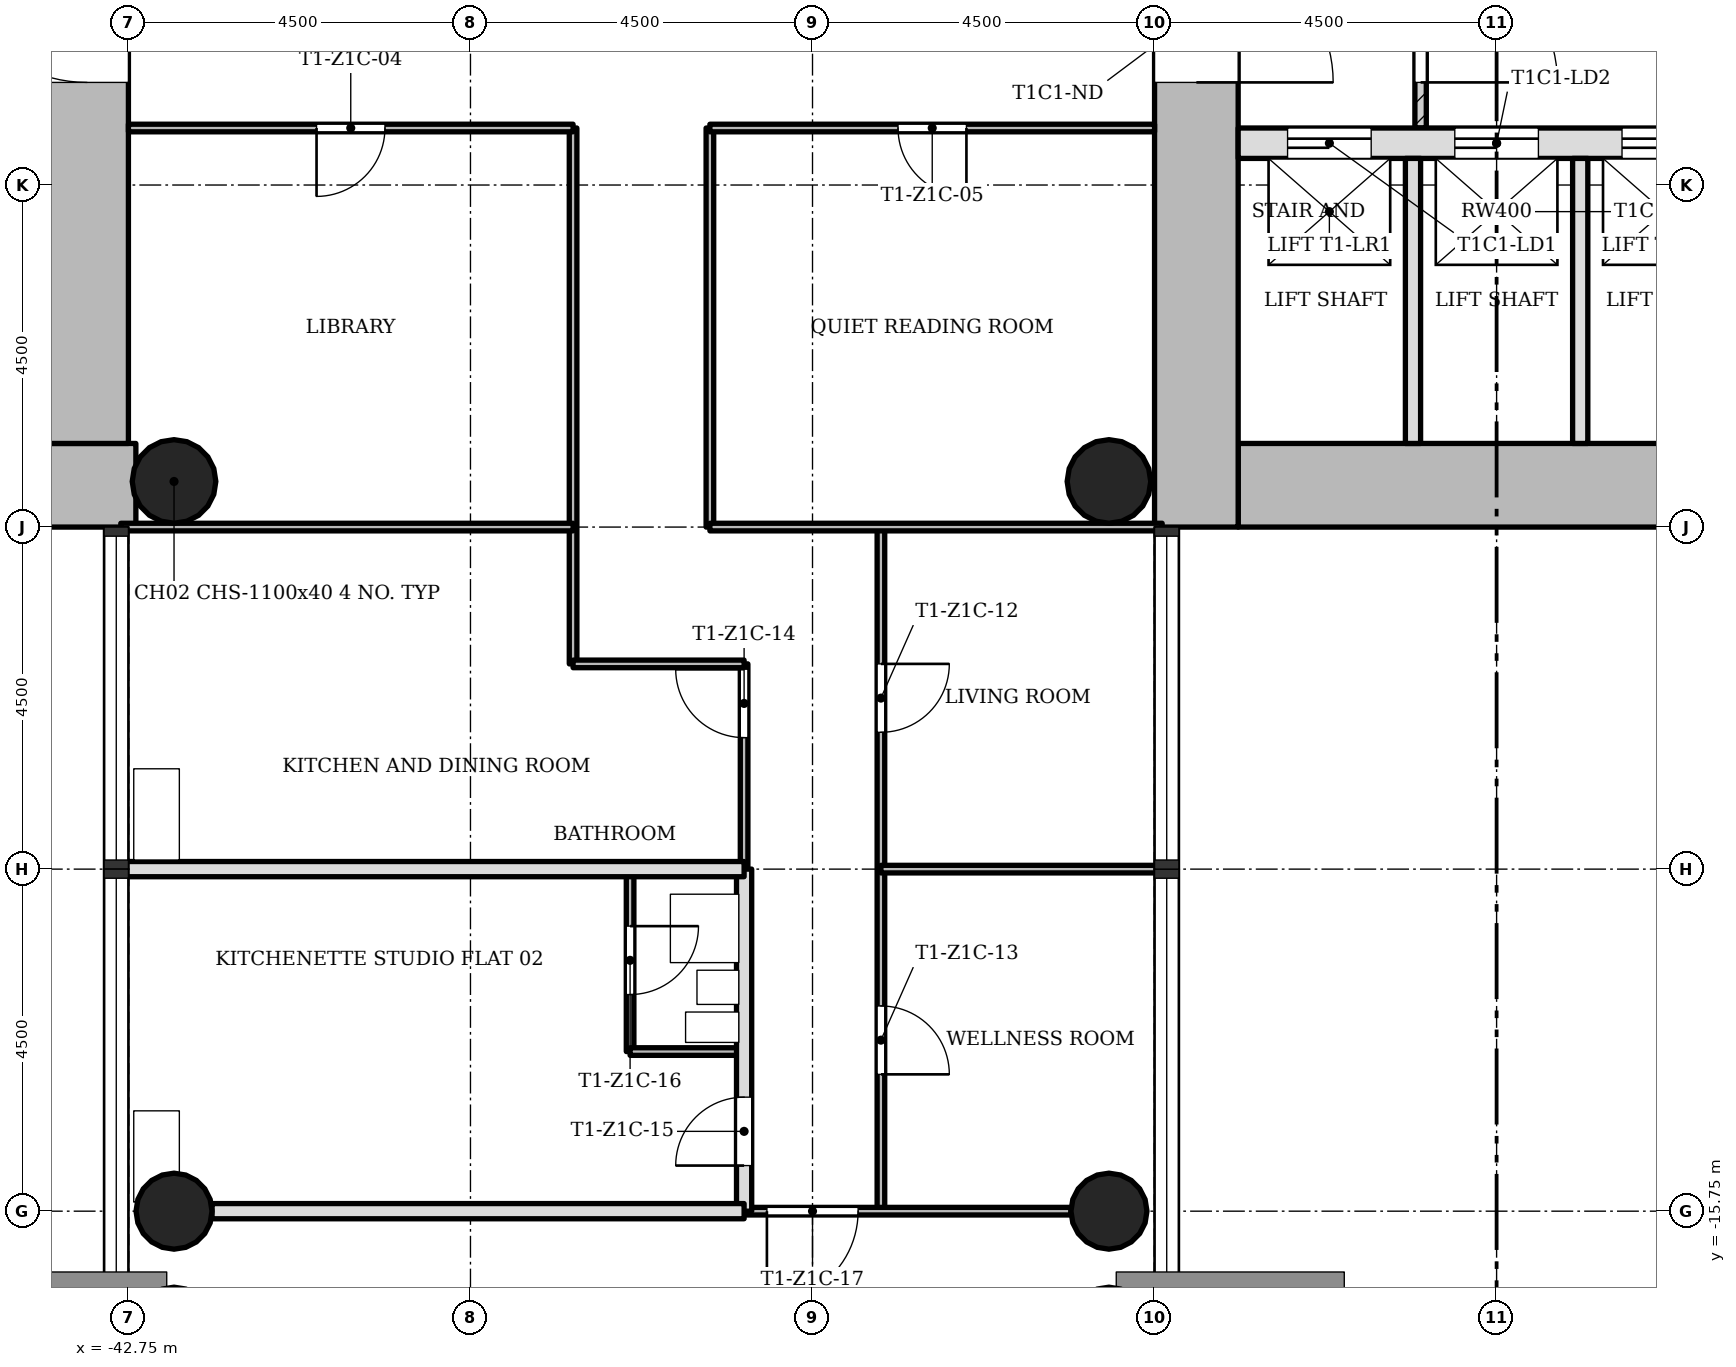
"""IFC4 building model, lengths in metres.
Left out: names, types, materials, properties, quantities, classifications, styles, units other than length and angle.
Written with IfcOpenShell. Run it as: python <this file> out.ifc"""

import sys

from ifc_helpers import new_model, si_unit, direction, frame, frame_2d, origin, origin_2d, place, context, subcontext, project, spatial, rectangle, hollow_circle, extrude, element, fill, save


model = new_model("IFC4")
c1 = context("Model", 3, precision=1e-05, world=origin(), true_north=direction((0.0, 1.0)))
c2 = subcontext(c1, "Body", "Model", "MODEL_VIEW")
j1 = project(units=[si_unit("LENGTHUNIT", "METRE"), si_unit("PLANEANGLEUNIT", "RADIAN")], contexts=[c1])
p1 = place(None, origin())
s1 = spatial("IfcSite", under=j1, at=p1, CompositionType="ELEMENT")
p2 = place(p1, origin())
s2 = spatial("IfcBuilding", under=s1, at=p2, CompositionType="ELEMENT")
p3 = place(p2, frame((0.0, 0.0, 51.7)))
s3 = spatial("IfcBuildingStorey", under=s2, at=p3, CompositionType="ELEMENT", Elevation=51.7)
p4 = place(p3, frame((-28.15, -6.2, 0.0), z_axis=(0.0, 0.0, 1.0), x_axis=(1.0, 0.0, 0.0)))
e1 = element("IfcWall", 1, at=p4, inside=s3, PredefinedType="SHEAR", context=c2, shape_type="SweptSolid", body=[
    extrude(rectangle(XDim=7.9, YDim=1.1, at=frame_2d((3.95, 0.0))), origin(), (0.0, 0.0, 1.0), 3.4),
])
p5 = place(p3, frame((-28.7, 5.65, 0.0), z_axis=(0.0, 0.0, 1.0), x_axis=(0.0, -1.0, 0.0)))
e2 = element("IfcWall", 2, at=p5, inside=s3, PredefinedType="SHEAR", context=c2, shape_type="SweptSolid", body=[
    extrude(rectangle(XDim=12.4, YDim=1.1, at=frame_2d((6.2, 0.0))), origin(), (0.0, 0.0, 1.0), 3.4),
])
p6 = place(p5, frame((4.75, 0.0, 0.0)))
e3 = element("IfcOpeningElement", 3, at=p6, cuts=e2, PredefinedType="OPENING", context=c2, shape_type="SweptSolid", body=[
    extrude(rectangle(XDim=1.8, YDim=2.1, at=frame_2d((0.9, 1.05))), frame((0.0, 0.56, 0.0), z_axis=(0.0, -1.0, 0.0), x_axis=(1.0, 0.0, 0.0)), (0.0, 0.0, 1.0), 1.12),
])
p7 = place(p3, frame((-28.15, -1.7, 0.0), z_axis=(0.0, 0.0, 1.0), x_axis=(1.0, 0.0, 0.0)))
e4 = element("IfcWall", 4, at=p7, inside=s3, PredefinedType="SHEAR", context=c2, shape_type="SweptSolid", body=[
    extrude(rectangle(XDim=6.8, YDim=0.4, at=frame_2d((3.4, 0.0))), origin(), (0.0, 0.0, 1.0), 3.4),
])
p8 = place(p7, frame((0.65, 0.0, 0.0)))
e5 = element("IfcOpeningElement", 5, at=p8, cuts=e4, PredefinedType="OPENING", context=c2, shape_type="SweptSolid", body=[
    extrude(rectangle(XDim=1.1, YDim=2.1, at=frame_2d((0.55, 1.05))), frame((0.0, 0.21, 0.0), z_axis=(0.0, -1.0, 0.0), x_axis=(1.0, 0.0, 0.0)), (0.0, 0.0, 1.0), 0.42),
])
p9 = place(p7, frame((2.85, 0.0, 0.0)))
e6 = element("IfcOpeningElement", 6, at=p9, cuts=e4, PredefinedType="OPENING", context=c2, shape_type="SweptSolid", body=[
    extrude(rectangle(XDim=1.1, YDim=2.1, at=frame_2d((0.55, 1.05))), frame((0.0, 0.21, 0.0), z_axis=(0.0, -1.0, 0.0), x_axis=(1.0, 0.0, 0.0)), (0.0, 0.0, 1.0), 0.42),
])
p10 = place(p7, frame((5.05, 0.0, 0.0)))
e7 = element("IfcOpeningElement", 7, at=p10, cuts=e4, PredefinedType="OPENING", context=c2, shape_type="SweptSolid", body=[
    extrude(rectangle(XDim=1.1, YDim=2.1, at=frame_2d((0.55, 1.05))), frame((0.0, 0.21, 0.0), z_axis=(0.0, -1.0, 0.0), x_axis=(1.0, 0.0, 0.0)), (0.0, 0.0, 1.0), 0.42),
])
p11 = place(p3, frame((-50.65, -6.2, 0.0), z_axis=(0.0, 0.0, 1.0), x_axis=(1.0, 0.0, 0.0)))
e8 = element("IfcWall", 8, at=p11, inside=s3, PredefinedType="SHEAR", context=c2, shape_type="SweptSolid", body=[
    extrude(rectangle(XDim=7.998, YDim=1.1, at=frame_2d((3.999, 0.0))), origin(), (0.0, 0.0, 1.0), 3.4),
])
p12 = place(p3, frame((-43.3, -5.65, 0.0), z_axis=(0.0, 0.0, 1.0), x_axis=(0.0, 1.0, 0.0)))
e9 = element("IfcWall", 9, at=p12, inside=s3, PredefinedType="SHEAR", context=c2, shape_type="SweptSolid", body=[
    extrude(rectangle(XDim=12.4, YDim=1.1, at=frame_2d((6.2, 0.0))), origin(), (0.0, 0.0, 1.0), 3.4),
])
p13 = place(p12, frame((4.75, 0.0, 0.0)))
e10 = element("IfcOpeningElement", 10, at=p13, cuts=e9, PredefinedType="OPENING", context=c2, shape_type="SweptSolid", body=[
    extrude(rectangle(XDim=1.8, YDim=2.1, at=frame_2d((0.9, 1.05))), frame((0.0, 0.56, 0.0), z_axis=(0.0, -1.0, 0.0), x_axis=(1.0, 0.0, 0.0)), (0.0, 0.0, 1.0), 1.12),
])
for number, where, z_axis, x_axis in (
    (11, (-42.15, -15.75, 0.0), (0.0, 0.0, 1.0), (1.0, 0.0, 0.0)),
    (12, (-29.85, -15.75, 0.0), (0.0, 0.0, 1.0), (1.0, 0.0, 0.0)),
):
    element("IfcColumn", number, at=place(p3, frame(where, z_axis=z_axis, x_axis=x_axis)), inside=s3, PredefinedType="COLUMN", context=c2, shape_type="SweptSolid", body=[
        extrude(hollow_circle(Radius=0.5, WallThickness=0.036, at=origin_2d()), origin(), (0.0, 0.0, 1.0), 3.4),
    ])
for number, where, z_axis, x_axis in (
    (13, (-42.15, -6.15, 0.0), (0.0, 0.0, 1.0), (1.0, 0.0, 0.0)),
    (14, (-29.85, -6.15, 0.0), (0.0, 0.0, 1.0), (1.0, 0.0, 0.0)),
):
    element("IfcColumn", number, at=place(p3, frame(where, z_axis=z_axis, x_axis=x_axis)), inside=s3, PredefinedType="COLUMN", context=c2, shape_type="SweptSolid", body=[
        extrude(hollow_circle(Radius=0.55, WallThickness=0.04, at=origin_2d()), origin(), (0.0, 0.0, 1.0), 3.4),
    ])
p14 = place(p3, frame((-25.75, -1.5, 0.0), z_axis=(0.0, 0.0, 1.0), x_axis=(0.0, 1.0, 0.0)))
e15 = element("IfcWall", 15, at=p14, inside=s3, PredefinedType="PARTITIONING", context=c2, shape_type="SweptSolid", body=[
    extrude(rectangle(XDim=3.0, YDim=0.15, at=frame_2d((1.5, 0.0))), origin(), (0.0, 0.0, 1.0), 3.0),
])
p15 = place(p14, frame((0.6, 0.0, 0.0)))
e16 = element("IfcOpeningElement", 16, at=p15, cuts=e15, PredefinedType="OPENING", context=c2, shape_type="SweptSolid", body=[
    extrude(rectangle(XDim=1.8, YDim=2.1, at=frame_2d((0.9, 1.05))), frame((0.0, 0.085, 0.0), z_axis=(0.0, -1.0, 0.0), x_axis=(1.0, 0.0, 0.0)), (0.0, 0.0, 1.0), 0.17),
])
for number, where, z_axis, x_axis in (
    (17, (-25.85, -5.65, 0.0), (0.0, 0.0, 1.0), (0.0, 1.0, 0.0)),
    (18, (-23.65, -5.65, 0.0), (0.0, 0.0, 1.0), (0.0, 1.0, 0.0)),
):
    element("IfcWall", number, at=place(p3, frame(where, z_axis=z_axis, x_axis=x_axis)), inside=s3, PredefinedType="SOLIDWALL", context=c2, shape_type="SweptSolid", body=[
        extrude(rectangle(XDim=3.75, YDim=0.2, at=frame_2d((1.875, 0.0))), origin(), (0.0, 0.0, 1.0), 3.0),
    ])
p16 = place(p3, frame((-36.9, -8.55, 0.0), z_axis=(0.0, 0.0, 1.0), x_axis=(0.0, 1.0, 0.0)))
e19 = element("IfcWall", 19, at=p16, inside=s3, PredefinedType="PARTITIONING", context=c2, shape_type="SweptSolid", body=[
    extrude(rectangle(XDim=7.05, YDim=0.1, at=frame_2d((3.525, 0.0))), origin(), (0.0, 0.0, 1.0), 3.0),
])
p17 = place(p3, frame((-36.15, -13.65, 0.0), z_axis=(0.0, 0.0, 1.0), x_axis=(0.0, 1.0, 0.0)))
e20 = element("IfcWall", 20, at=p17, inside=s3, PredefinedType="PARTITIONING", context=c2, shape_type="SweptSolid", body=[
    extrude(rectangle(XDim=2.4, YDim=0.1, at=frame_2d((1.2, 0.0))), origin(), (0.0, 0.0, 1.0), 3.0),
])
p18 = place(p17, frame((0.75, 0.0, 0.0)))
e21 = element("IfcOpeningElement", 21, at=p18, cuts=e20, PredefinedType="OPENING", context=c2, shape_type="SweptSolid", body=[
    extrude(rectangle(XDim=0.9, YDim=2.1, at=frame_2d((0.45, 1.05))), frame((0.0, 0.06, 0.0), z_axis=(0.0, -1.0, 0.0), x_axis=(1.0, 0.0, 0.0)), (0.0, 0.0, 1.0), 0.12),
])
p19 = place(p3, frame((-35.1, -6.75, 0.0), z_axis=(0.0, 0.0, 1.0), x_axis=(0.0, 1.0, 0.0)))
e22 = element("IfcWall", 22, at=p19, inside=s3, PredefinedType="PARTITIONING", context=c2, shape_type="SweptSolid", body=[
    extrude(rectangle(XDim=5.25, YDim=0.1, at=frame_2d((2.625, 0.0))), origin(), (0.0, 0.0, 1.0), 3.0),
])
p20 = place(p3, frame((-34.65, -11.25, 0.0), z_axis=(0.0, 0.0, 1.0), x_axis=(0.0, 1.0, 0.0)))
e23 = element("IfcWall", 23, at=p20, inside=s3, PredefinedType="PARTITIONING", context=c2, shape_type="SweptSolid", body=[
    extrude(rectangle(XDim=2.7, YDim=0.1, at=frame_2d((1.35, 0.0))), origin(), (0.0, 0.0, 1.0), 3.0),
])
p21 = place(p20, frame((1.73, 0.0, 0.0)))
e24 = element("IfcOpeningElement", 24, at=p21, cuts=e23, PredefinedType="OPENING", context=c2, shape_type="SweptSolid", body=[
    extrude(rectangle(XDim=0.9, YDim=2.1, at=frame_2d((0.45, 1.05))), frame((0.0, 0.06, 0.0), z_axis=(0.0, -1.0, 0.0), x_axis=(1.0, 0.0, 0.0)), (0.0, 0.0, 1.0), 0.12),
])
p22 = place(p3, frame((-34.65, -15.75, 0.0), z_axis=(0.0, 0.0, 1.0), x_axis=(0.0, 1.0, 0.0)))
e25 = element("IfcWall", 25, at=p22, inside=s3, PredefinedType="SOLIDWALL", context=c2, shape_type="SweptSolid", body=[
    extrude(rectangle(XDim=4.5, YDim=0.2, at=frame_2d((2.25, 0.0))), origin(), (0.0, 0.0, 1.0), 3.0),
])
p23 = place(p22, frame((0.6, 0.0, 0.0)))
e26 = element("IfcOpeningElement", 26, at=p23, cuts=e25, PredefinedType="OPENING", context=c2, shape_type="SweptSolid", body=[
    extrude(rectangle(XDim=0.9, YDim=2.1, at=frame_2d((0.45, 1.05))), frame((0.0, 0.11, 0.0), z_axis=(0.0, -1.0, 0.0), x_axis=(1.0, 0.0, 0.0)), (0.0, 0.0, 1.0), 0.22),
])
p24 = place(p3, frame((-32.85, -15.75, 0.0), z_axis=(0.0, 0.0, 1.0), x_axis=(0.0, 1.0, 0.0)))
e27 = element("IfcWall", 27, at=p24, inside=s3, PredefinedType="PARTITIONING", context=c2, shape_type="SweptSolid", body=[
    extrude(rectangle(XDim=9.0, YDim=0.1, at=frame_2d((4.5, 0.0))), origin(), (0.0, 0.0, 1.0), 3.0),
])
p25 = place(p24, frame((6.3, 0.0, 0.0)))
e28 = element("IfcOpeningElement", 28, at=p25, cuts=e27, PredefinedType="OPENING", context=c2, shape_type="SweptSolid", body=[
    extrude(rectangle(XDim=0.9, YDim=2.1, at=frame_2d((0.45, 1.05))), frame((0.0, 0.06, 0.0), z_axis=(0.0, -1.0, 0.0), x_axis=(1.0, 0.0, 0.0)), (0.0, 0.0, 1.0), 0.12),
])
p26 = place(p24, frame((1.8, 0.0, 0.0)))
e29 = element("IfcOpeningElement", 29, at=p26, cuts=e27, PredefinedType="OPENING", context=c2, shape_type="SweptSolid", body=[
    extrude(rectangle(XDim=0.9, YDim=2.1, at=frame_2d((0.45, 1.05))), frame((0.0, 0.06, 0.0), z_axis=(0.0, -1.0, 0.0), x_axis=(1.0, 0.0, 0.0)), (0.0, 0.0, 1.0), 0.12),
])
p27 = place(p3, frame((-34.65, -15.75, 0.0), z_axis=(0.0, 0.0, 1.0), x_axis=(1.0, 0.0, 0.0)))
e30 = element("IfcWall", 30, at=p27, inside=s3, PredefinedType="PARTITIONING", context=c2, shape_type="SweptSolid", body=[
    extrude(rectangle(XDim=4.3, YDim=0.1, at=frame_2d((2.15, 0.0))), origin(), (0.0, 0.0, 1.0), 3.0),
])
p28 = place(p27, frame((0.3, 0.0, 0.0)))
e31 = element("IfcOpeningElement", 31, at=p28, cuts=e30, PredefinedType="OPENING", context=c2, shape_type="SweptSolid", body=[
    extrude(rectangle(XDim=1.2, YDim=2.1, at=frame_2d((0.6, 1.05))), frame((0.0, 0.06, 0.0), z_axis=(0.0, -1.0, 0.0), x_axis=(1.0, 0.0, 0.0)), (0.0, 0.0, 1.0), 0.12),
])
p29 = place(p3, frame((-41.65, -15.75, 0.0), z_axis=(0.0, 0.0, 1.0), x_axis=(1.0, 0.0, 0.0)))
e32 = element("IfcWall", 32, at=p29, inside=s3, PredefinedType="SOLIDWALL", context=c2, shape_type="SweptSolid", body=[
    extrude(rectangle(XDim=7.0, YDim=0.2, at=frame_2d((3.5, 0.0))), origin(), (0.0, 0.0, 1.0), 3.0),
])
p30 = place(p3, frame((-36.15, -13.65, 0.0), z_axis=(0.0, 0.0, 1.0), x_axis=(1.0, 0.0, 0.0)))
e33 = element("IfcWall", 33, at=p30, inside=s3, PredefinedType="PARTITIONING", context=c2, shape_type="SweptSolid", body=[
    extrude(rectangle(XDim=1.5, YDim=0.1, at=frame_2d((0.75, 0.0))), origin(), (0.0, 0.0, 1.0), 3.0),
])
p31 = place(p3, frame((-32.85, -11.25, 0.0), z_axis=(0.0, 0.0, 1.0), x_axis=(1.0, 0.0, 0.0)))
e34 = element("IfcWall", 34, at=p31, inside=s3, PredefinedType="PARTITIONING", context=c2, shape_type="SweptSolid", body=[
    extrude(rectangle(XDim=3.7, YDim=0.1, at=frame_2d((1.85, 0.0))), origin(), (0.0, 0.0, 1.0), 3.0),
])
p32 = place(p3, frame((-42.85, -11.25, 0.0), z_axis=(0.0, 0.0, 1.0), x_axis=(1.0, 0.0, 0.0)))
e35 = element("IfcWall", 35, at=p32, inside=s3, PredefinedType="SOLIDWALL", context=c2, shape_type="SweptSolid", body=[
    extrude(rectangle(XDim=8.2, YDim=0.2, at=frame_2d((4.1, 0.0))), origin(), (0.0, 0.0, 1.0), 3.0),
])
p33 = place(p3, frame((-36.9, -8.55, 0.0), z_axis=(0.0, 0.0, 1.0), x_axis=(1.0, 0.0, 0.0)))
e36 = element("IfcWall", 36, at=p33, inside=s3, PredefinedType="PARTITIONING", context=c2, shape_type="SweptSolid", body=[
    extrude(rectangle(XDim=2.25, YDim=0.1, at=frame_2d((1.125, 0.0))), origin(), (0.0, 0.0, 1.0), 3.0),
])
for number, where, z_axis, x_axis in (
    (37, (-42.85, -6.75, 0.0), (0.0, 0.0, 1.0), (1.0, 0.0, 0.0)),
    (38, (-35.1, -6.75, 0.0), (0.0, 0.0, 1.0), (1.0, 0.0, 0.0)),
):
    element("IfcWall", number, at=place(p3, frame(where, z_axis=z_axis, x_axis=x_axis)), inside=s3, PredefinedType="PARTITIONING", context=c2, shape_type="SweptSolid", body=[
        extrude(rectangle(XDim=5.95, YDim=0.1, at=frame_2d((2.975, 0.0))), origin(), (0.0, 0.0, 1.0), 3.0),
    ])
p34 = place(p3, frame((-42.75, -1.5, 0.0), z_axis=(0.0, 0.0, 1.0), x_axis=(1.0, 0.0, 0.0)))
e39 = element("IfcWall", 39, at=p34, inside=s3, PredefinedType="PARTITIONING", context=c2, shape_type="SweptSolid", body=[
    extrude(rectangle(XDim=5.85, YDim=0.1, at=frame_2d((2.925, 0.0))), origin(), (0.0, 0.0, 1.0), 3.0),
])
p35 = place(p34, frame((2.475, 0.0, 0.0)))
e40 = element("IfcOpeningElement", 40, at=p35, cuts=e39, PredefinedType="OPENING", context=c2, shape_type="SweptSolid", body=[
    extrude(rectangle(XDim=0.9, YDim=2.1, at=frame_2d((0.45, 1.05))), frame((0.0, 0.06, 0.0), z_axis=(0.0, -1.0, 0.0), x_axis=(1.0, 0.0, 0.0)), (0.0, 0.0, 1.0), 0.12),
])
p36 = place(p3, frame((-35.1, -1.5, 0.0), z_axis=(0.0, 0.0, 1.0), x_axis=(1.0, 0.0, 0.0)))
e41 = element("IfcWall", 41, at=p36, inside=s3, PredefinedType="PARTITIONING", context=c2, shape_type="SweptSolid", body=[
    extrude(rectangle(XDim=5.85, YDim=0.1, at=frame_2d((2.925, 0.0))), origin(), (0.0, 0.0, 1.0), 3.0),
])
p37 = place(p36, frame((2.475, 0.0, 0.0)))
e42 = element("IfcOpeningElement", 42, at=p37, cuts=e41, PredefinedType="OPENING", context=c2, shape_type="SweptSolid", body=[
    extrude(rectangle(XDim=0.9, YDim=2.1, at=frame_2d((0.45, 1.05))), frame((0.0, 0.06, 0.0), z_axis=(0.0, -1.0, 0.0), x_axis=(1.0, 0.0, 0.0)), (0.0, 0.0, 1.0), 0.12),
])
p38 = place(p15, origin())
e43 = element("IfcDoor", 43, at=p38, inside=s3, OperationType="SINGLE_SWING_LEFT", PredefinedType="DOOR", context=c2, shape_type="SweptSolid", body=[
    extrude(rectangle(XDim=1.8, YDim=2.1, at=frame_2d((0.9, 1.05))), frame((0.0, 0.025, 0.0), z_axis=(0.0, -1.0, 0.0), x_axis=(1.0, 0.0, 0.0)), (0.0, 0.0, 1.0), 0.05),
])
fill(e16, e43)
p39 = place(p35, origin())
e44 = element("IfcDoor", 44, at=p39, inside=s3, OperationType="SINGLE_SWING_LEFT", PredefinedType="DOOR", context=c2, shape_type="SweptSolid", body=[
    extrude(rectangle(XDim=0.9, YDim=2.1, at=frame_2d((0.45, 1.05))), frame((0.0, 0.025, 0.0), z_axis=(0.0, -1.0, 0.0), x_axis=(1.0, 0.0, 0.0)), (0.0, 0.0, 1.0), 0.05),
])
fill(e40, e44)
p40 = place(p37, origin())
e45 = element("IfcDoor", 45, at=p40, inside=s3, OperationType="SINGLE_SWING_RIGHT", PredefinedType="DOOR", context=c2, shape_type="SweptSolid", body=[
    extrude(rectangle(XDim=0.9, YDim=2.1, at=frame_2d((0.45, 1.05))), frame((0.0, 0.025, 0.0), z_axis=(0.0, -1.0, 0.0), x_axis=(1.0, 0.0, 0.0)), (0.0, 0.0, 1.0), 0.05),
])
fill(e42, e45)
p41 = place(p25, origin())
e46 = element("IfcDoor", 46, at=p41, inside=s3, OperationType="SINGLE_SWING_RIGHT", PredefinedType="DOOR", context=c2, shape_type="SweptSolid", body=[
    extrude(rectangle(XDim=0.9, YDim=2.1, at=frame_2d((0.45, 1.05))), frame((0.0, 0.025, 0.0), z_axis=(0.0, -1.0, 0.0), x_axis=(1.0, 0.0, 0.0)), (0.0, 0.0, 1.0), 0.05),
])
fill(e28, e46)
p42 = place(p26, origin())
e47 = element("IfcDoor", 47, at=p42, inside=s3, OperationType="SINGLE_SWING_LEFT", PredefinedType="DOOR", context=c2, shape_type="SweptSolid", body=[
    extrude(rectangle(XDim=0.9, YDim=2.1, at=frame_2d((0.45, 1.05))), frame((0.0, 0.025, 0.0), z_axis=(0.0, -1.0, 0.0), x_axis=(1.0, 0.0, 0.0)), (0.0, 0.0, 1.0), 0.05),
])
fill(e29, e47)
p43 = place(p21, origin())
e48 = element("IfcDoor", 48, at=p43, inside=s3, OperationType="SINGLE_SWING_LEFT", PredefinedType="DOOR", context=c2, shape_type="SweptSolid", body=[
    extrude(rectangle(XDim=0.9, YDim=2.1, at=frame_2d((0.45, 1.05))), frame((0.0, 0.025, 0.0), z_axis=(0.0, -1.0, 0.0), x_axis=(1.0, 0.0, 0.0)), (0.0, 0.0, 1.0), 0.05),
])
fill(e24, e48)
p44 = place(p23, origin())
e49 = element("IfcDoor", 49, at=p44, inside=s3, OperationType="SINGLE_SWING_RIGHT", PredefinedType="DOOR", context=c2, shape_type="SweptSolid", body=[
    extrude(rectangle(XDim=0.9, YDim=2.1, at=frame_2d((0.45, 1.05))), frame((0.0, 0.025, 0.0), z_axis=(0.0, -1.0, 0.0), x_axis=(1.0, 0.0, 0.0)), (0.0, 0.0, 1.0), 0.05),
])
fill(e26, e49)
p45 = place(p18, origin())
e50 = element("IfcDoor", 50, at=p45, inside=s3, OperationType="SINGLE_SWING_RIGHT", PredefinedType="DOOR", context=c2, shape_type="SweptSolid", body=[
    extrude(rectangle(XDim=0.9, YDim=2.1, at=frame_2d((0.45, 1.05))), frame((0.0, 0.025, 0.0), z_axis=(0.0, -1.0, 0.0), x_axis=(1.0, 0.0, 0.0)), (0.0, 0.0, 1.0), 0.05),
])
fill(e21, e50)
p46 = place(p28, origin())
e51 = element("IfcDoor", 51, at=p46, inside=s3, OperationType="SINGLE_SWING_LEFT", PredefinedType="DOOR", context=c2, shape_type="SweptSolid", body=[
    extrude(rectangle(XDim=1.2, YDim=2.1, at=frame_2d((0.6, 1.05))), frame((0.0, 0.025, 0.0), z_axis=(0.0, -1.0, 0.0), x_axis=(1.0, 0.0, 0.0)), (0.0, 0.0, 1.0), 0.05),
])
fill(e31, e51)
p47 = place(p8, origin())
e52 = element("IfcDoor", 52, at=p47, inside=s3, OperationType="SLIDING_TO_LEFT", PredefinedType="DOOR", context=c2, shape_type="SweptSolid", body=[
    extrude(rectangle(XDim=1.1, YDim=2.1, at=frame_2d((0.55, 1.05))), frame((0.0, 0.025, 0.0), z_axis=(0.0, -1.0, 0.0), x_axis=(1.0, 0.0, 0.0)), (0.0, 0.0, 1.0), 0.05),
])
fill(e5, e52)
p48 = place(p9, origin())
e53 = element("IfcDoor", 53, at=p48, inside=s3, OperationType="SLIDING_TO_LEFT", PredefinedType="DOOR", context=c2, shape_type="SweptSolid", body=[
    extrude(rectangle(XDim=1.1, YDim=2.1, at=frame_2d((0.55, 1.05))), frame((0.0, 0.025, 0.0), z_axis=(0.0, -1.0, 0.0), x_axis=(1.0, 0.0, 0.0)), (0.0, 0.0, 1.0), 0.05),
])
fill(e6, e53)
p49 = place(p10, origin())
e54 = element("IfcDoor", 54, at=p49, inside=s3, OperationType="SLIDING_TO_LEFT", PredefinedType="DOOR", context=c2, shape_type="SweptSolid", body=[
    extrude(rectangle(XDim=1.1, YDim=2.1, at=frame_2d((0.55, 1.05))), frame((0.0, 0.025, 0.0), z_axis=(0.0, -1.0, 0.0), x_axis=(1.0, 0.0, 0.0)), (0.0, 0.0, 1.0), 0.05),
])
fill(e7, e54)
p50 = place(p6, origin())
e55 = element("IfcDoor", 55, at=p50, inside=s3, OperationType="SINGLE_SWING_LEFT", PredefinedType="DOOR", context=c2, shape_type="SweptSolid", body=[
    extrude(rectangle(XDim=1.8, YDim=2.1, at=frame_2d((0.9, 1.05))), frame((0.0, 0.025, 0.0), z_axis=(0.0, -1.0, 0.0), x_axis=(1.0, 0.0, 0.0)), (0.0, 0.0, 1.0), 0.05),
])
fill(e3, e55)
p51 = place(p13, origin())
e56 = element("IfcDoor", 56, at=p51, inside=s3, OperationType="SINGLE_SWING_LEFT", PredefinedType="DOOR", context=c2, shape_type="SweptSolid", body=[
    extrude(rectangle(XDim=1.8, YDim=2.1, at=frame_2d((0.9, 1.05))), frame((0.0, 0.025, 0.0), z_axis=(0.0, -1.0, 0.0), x_axis=(1.0, 0.0, 0.0)), (0.0, 0.0, 1.0), 0.05),
])
fill(e10, e56)
save(model, sys.argv[1])
